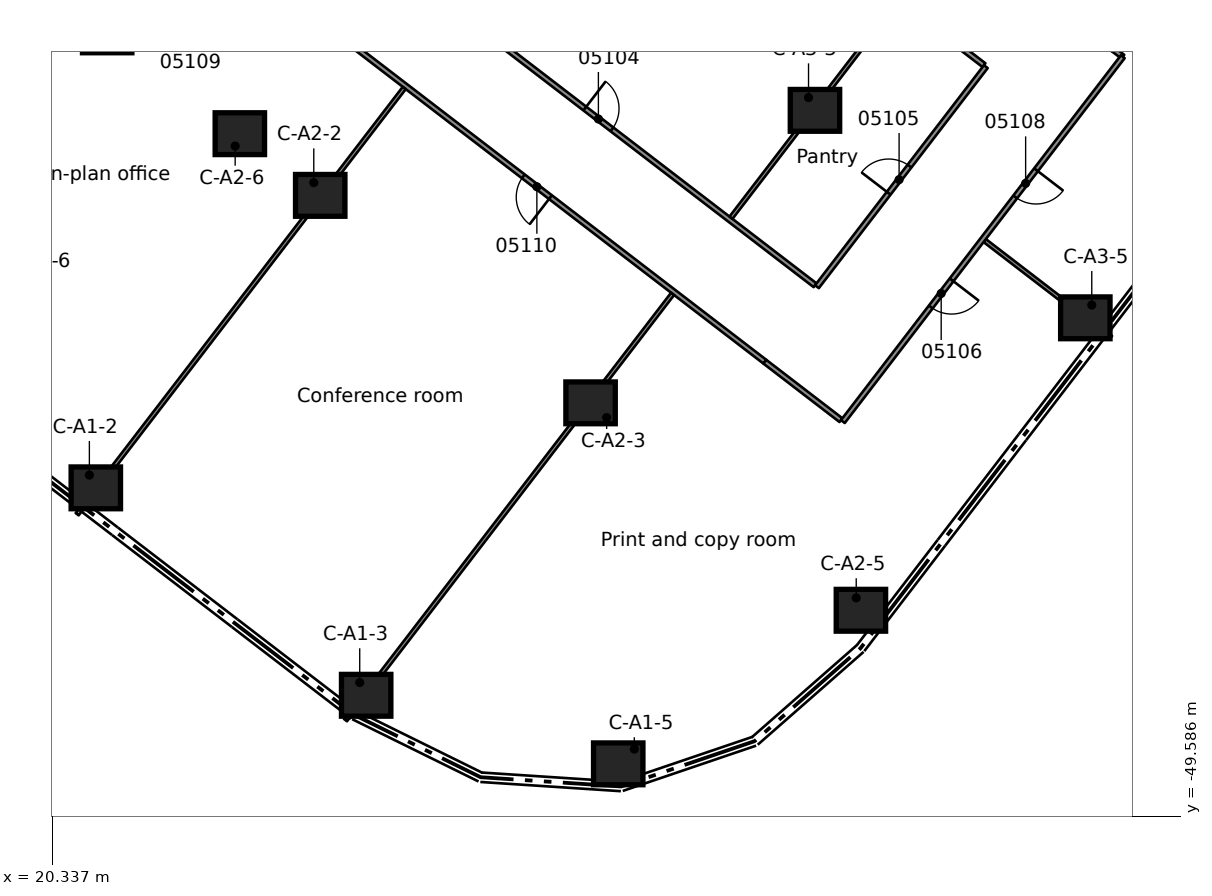
"""IFC4 building model, lengths in metres.
Left out: names, types, materials, properties, quantities, classifications, styles, units other than length and angle.
Written with IfcOpenShell. Run it as: python <this file> out.ifc"""

import sys

from ifc_helpers import new_model, si_unit, direction, frame, frame_2d, origin, origin_2d, place, context, subcontext, project, spatial, rectangle, extrude, element, fill, save


model = new_model("IFC4")
c1 = context("Model", 3, precision=1e-05, world=origin(), true_north=direction((0.0, 1.0)))
c2 = subcontext(c1, "Body", "Model", "MODEL_VIEW")
j1 = project(units=[si_unit("LENGTHUNIT", "METRE"), si_unit("PLANEANGLEUNIT", "RADIAN")], contexts=[c1])
p1 = place(None, origin())
s1 = spatial("IfcSite", under=j1, at=p1, CompositionType="ELEMENT")
p2 = place(p1, origin())
s2 = spatial("IfcBuilding", under=s1, at=p2, CompositionType="ELEMENT")
p3 = place(p2, frame((0.0, 0.0, 25.1)))
s3 = spatial("IfcBuildingStorey", under=s2, at=p3, CompositionType="ELEMENT", Elevation=25.1)
for number, where, z_axis, x_axis in (
    (1, (21.484, -40.939, 0.0), (0.0, 0.0, 1.0), (1.0, 0.0, 0.0)),
    (2, (28.598, -46.397, 0.0), (0.0, 0.0, 1.0), (1.0, 0.0, 0.0)),
    (3, (35.231, -48.201, 0.0), (0.0, 0.0, 1.0), (1.0, 0.0, 0.0)),
    (4, (27.389, -33.243, 0.0), (0.0, 0.0, 1.0), (1.0, 0.0, 0.0)),
    (5, (34.503, -38.702, 0.0), (0.0, 0.0, 1.0), (1.0, 0.0, 0.0)),
    (6, (41.617, -44.16, 0.0), (0.0, 0.0, 1.0), (1.0, 0.0, 0.0)),
    (7, (25.274, -31.62, 0.0), (0.0, 0.0, 1.0), (1.0, 0.0, 0.0)),
    (8, (21.783, -28.941, 0.0), (0.0, 0.0, 1.0), (1.0, 0.0, 0.0)),
    (9, (40.408, -31.006, 0.0), (0.0, 0.0, 1.0), (1.0, 0.0, 0.0)),
    (10, (47.522, -36.465, 0.0), (0.0, 0.0, 1.0), (1.0, 0.0, 0.0)),
):
    element("IfcColumn", number, at=place(p3, frame(where, z_axis=z_axis, x_axis=x_axis)), inside=s3, PredefinedType="COLUMN", context=c2, shape_type="SweptSolid", body=[
        extrude(rectangle(XDim=1.3, YDim=1.1, at=origin_2d()), origin(), (0.0, 0.0, 1.0), 4.1),
    ])
p4 = place(p3, frame((48.27, -29.412, 0.0), z_axis=(0.0, 0.0, 1.0), x_axis=(0.793016893484, -0.609199644328, 0.0)))
e11 = element("IfcWall", 11, at=p4, inside=s3, PredefinedType="PARTITIONING", context=c2, shape_type="SweptSolid", body=[
    extrude(rectangle(XDim=0.3, YDim=0.125, at=frame_2d((0.15, 0.0))), origin(), (0.0, 0.0, 1.0), 3.68),
])
p5 = place(p3, frame((39.09, -37.62, 0.0), z_axis=(0.0, 0.0, 1.0), x_axis=(-0.793364364442, 0.608747061786, 0.0)))
e12 = element("IfcWall", 12, at=p5, inside=s3, PredefinedType="PARTITIONING", context=c2, shape_type="SweptSolid", body=[
    extrude(rectangle(XDim=22.17, YDim=0.125, at=frame_2d((11.085, 0.0))), origin(), (0.0, 0.0, 1.0), 3.68),
])
p6 = place(p5, frame((16.263, 0.0, 0.0)))
e13 = element("IfcOpeningElement", 13, at=p6, cuts=e12, PredefinedType="OPENING", context=c2, shape_type="SweptSolid", body=[
    extrude(rectangle(XDim=1.8, YDim=2.1, at=frame_2d((0.9, 1.05))), frame((0.0, 0.073, 0.0), z_axis=(0.0, -1.0, 0.0), x_axis=(1.0, 0.0, 0.0)), (0.0, 0.0, 1.0), 0.145),
])
p7 = place(p5, frame((7.113, 0.0, 0.0)))
e14 = element("IfcOpeningElement", 14, at=p7, cuts=e12, PredefinedType="OPENING", context=c2, shape_type="SweptSolid", body=[
    extrude(rectangle(XDim=0.9, YDim=2.1, at=frame_2d((0.45, 1.05))), frame((0.0, 0.073, 0.0), z_axis=(0.0, -1.0, 0.0), x_axis=(1.0, 0.0, 0.0)), (0.0, 0.0, 1.0), 0.145),
])
p8 = place(p3, frame((39.089, -37.62, 0.0), z_axis=(0.0, 0.0, 1.0), x_axis=(0.793216962218, -0.608939119166, 0.0)))
e15 = element("IfcWall", 15, at=p8, inside=s3, PredefinedType="PARTITIONING", context=c2, shape_type="SweptSolid", body=[
    extrude(rectangle(XDim=2.524, YDim=0.125, at=frame_2d((1.262, 0.0))), origin(), (0.0, 0.0, 1.0), 3.68),
])
p9 = place(p3, frame((23.132, -22.35, 0.0), z_axis=(0.0, 0.0, 1.0), x_axis=(0.79336850047, -0.60874167137, 0.0)))
e16 = element("IfcWall", 16, at=p9, inside=s3, PredefinedType="PARTITIONING", context=c2, shape_type="SweptSolid", body=[
    extrude(rectangle(XDim=21.779, YDim=0.125, at=frame_2d((10.89, 0.0))), origin(), (0.0, 0.0, 1.0), 3.68),
])
p10 = place(p9, frame((4.6, 0.0, 0.0)))
e17 = element("IfcOpeningElement", 17, at=p10, cuts=e16, PredefinedType="OPENING", context=c2, shape_type="SweptSolid", body=[
    extrude(rectangle(XDim=0.9, YDim=2.1, at=frame_2d((0.45, 1.05))), frame((0.0, 0.073, 0.0), z_axis=(0.0, -1.0, 0.0), x_axis=(1.0, 0.0, 0.0)), (0.0, 0.0, 1.0), 0.145),
])
p11 = place(p9, frame((14.142, 0.0, 0.0)))
e18 = element("IfcOpeningElement", 18, at=p11, cuts=e16, PredefinedType="OPENING", context=c2, shape_type="SweptSolid", body=[
    extrude(rectangle(XDim=0.9, YDim=2.1, at=frame_2d((0.45, 1.05))), frame((0.0, 0.073, 0.0), z_axis=(0.0, -1.0, 0.0), x_axis=(1.0, 0.0, 0.0)), (0.0, 0.0, 1.0), 0.145),
])
p12 = place(p3, frame((44.875, -34.433, 0.0), z_axis=(0.0, 0.0, 1.0), x_axis=(0.793295570217, -0.60883670904, 0.0)))
e19 = element("IfcWall", 19, at=p12, inside=s3, PredefinedType="PARTITIONING", context=c2, shape_type="SweptSolid", body=[
    extrude(rectangle(XDim=4.186, YDim=0.1, at=frame_2d((2.093, 0.0))), origin(), (0.0, 0.0, 1.0), 3.68),
])
p13 = place(p3, frame((44.855, -29.817, 0.0), z_axis=(0.0, 0.0, 1.0), x_axis=(-0.793378264443, 0.608728945844, 0.0)))
e20 = element("IfcWall", 20, at=p13, inside=s3, PredefinedType="PARTITIONING", context=c2, shape_type="SweptSolid", body=[
    extrude(rectangle(XDim=21.16, YDim=0.125, at=frame_2d((10.58, 0.0))), origin(), (0.0, 0.0, 1.0), 3.68),
])
p14 = place(p13, frame((16.337, 0.0, 0.0)))
e21 = element("IfcOpeningElement", 21, at=p14, cuts=e20, PredefinedType="OPENING", context=c2, shape_type="SweptSolid", body=[
    extrude(rectangle(XDim=0.9, YDim=2.1, at=frame_2d((0.45, 1.05))), frame((0.0, 0.073, 0.0), z_axis=(0.0, -1.0, 0.0), x_axis=(1.0, 0.0, 0.0)), (0.0, 0.0, 1.0), 0.145),
])
p15 = place(p3, frame((48.508, -29.595, 0.0), z_axis=(0.0, 0.0, 1.0), x_axis=(-0.608738166201, -0.793371189929, 0.0)))
e22 = element("IfcWall", 22, at=p15, inside=s3, PredefinedType="PARTITIONING", context=c2, shape_type="SweptSolid", body=[
    extrude(rectangle(XDim=12.1, YDim=0.125, at=frame_2d((6.05, 0.0))), origin(), (0.0, 0.0, 1.0), 3.68),
])
p16 = place(p15, frame((7.4, 0.0, 0.0)))
e23 = element("IfcOpeningElement", 23, at=p16, cuts=e22, PredefinedType="OPENING", context=c2, shape_type="SweptSolid", body=[
    extrude(rectangle(XDim=0.9, YDim=2.1, at=frame_2d((0.45, 1.05))), frame((0.0, 0.073, 0.0), z_axis=(0.0, -1.0, 0.0), x_axis=(1.0, 0.0, 0.0)), (0.0, 0.0, 1.0), 0.145),
])
p17 = place(p15, frame((3.75, 0.0, 0.0)))
e24 = element("IfcOpeningElement", 24, at=p17, cuts=e22, PredefinedType="OPENING", context=c2, shape_type="SweptSolid", body=[
    extrude(rectangle(XDim=0.9, YDim=2.1, at=frame_2d((0.45, 1.05))), frame((0.0, 0.073, 0.0), z_axis=(0.0, -1.0, 0.0), x_axis=(1.0, 0.0, 0.0)), (0.0, 0.0, 1.0), 0.145),
])
p18 = place(p3, frame((40.46, -35.646, 0.0), z_axis=(0.0, 0.0, 1.0), x_axis=(0.608868228501, 0.793271378736, 0.0)))
e25 = element("IfcWall", 25, at=p18, inside=s3, PredefinedType="PARTITIONING", context=c2, shape_type="SweptSolid", body=[
    extrude(rectangle(XDim=7.299, YDim=0.125, at=frame_2d((3.649, 0.0))), origin(), (0.0, 0.0, 1.0), 3.68),
])
p19 = place(p18, frame((3.1, 0.0, 0.0)))
e26 = element("IfcOpeningElement", 26, at=p19, cuts=e25, PredefinedType="OPENING", context=c2, shape_type="SweptSolid", body=[
    extrude(rectangle(XDim=0.9, YDim=2.1, at=frame_2d((0.45, 1.05))), frame((0.0, 0.073, 0.0), z_axis=(0.0, -1.0, 0.0), x_axis=(1.0, 0.0, 0.0)), (0.0, 0.0, 1.0), 0.145),
])
p20 = place(p3, frame((28.054, -47.051, 0.0), z_axis=(0.0, 0.0, 1.0), x_axis=(0.608819037892, 0.793309132117, 0.0)))
e27 = element("IfcWall", 27, at=p20, inside=s3, PredefinedType="PARTITIONING", context=c2, shape_type="SweptSolid", body=[
    extrude(rectangle(XDim=14.137, YDim=0.1, at=frame_2d((7.069, 0.0))), origin(), (0.0, 0.0, 1.0), 3.68),
])
p21 = place(p3, frame((38.198, -33.831, 0.0), z_axis=(0.0, 0.0, 1.0), x_axis=(0.60875801413, 0.793355960608, 0.0)))
e28 = element("IfcWall", 28, at=p21, inside=s3, PredefinedType="PARTITIONING", context=c2, shape_type="SweptSolid", body=[
    extrude(rectangle(XDim=7.174, YDim=0.1, at=frame_2d((3.587, 0.0))), origin(), (0.0, 0.0, 1.0), 3.68),
])
p22 = place(p3, frame((20.993, -41.633, 0.0), z_axis=(0.0, 0.0, 1.0), x_axis=(0.608829906099, 0.793300791277, 0.0)))
e29 = element("IfcWall", 29, at=p22, inside=s3, PredefinedType="PARTITIONING", context=c2, shape_type="SweptSolid", body=[
    extrude(rectangle(XDim=14.137, YDim=0.1, at=frame_2d((7.069, 0.0))), origin(), (0.0, 0.0, 1.0), 3.68),
])
p23 = place(p3, frame((12.817, -35.359, 0.0), z_axis=(0.0, 0.0, 1.0), x_axis=(0.608769712687, 0.793346983932, 0.0)))
e30 = element("IfcWall", 30, at=p23, inside=s3, PredefinedType="PARTITIONING", context=c2, shape_type="SweptSolid", body=[
    extrude(rectangle(XDim=14.199, YDim=0.1, at=frame_2d((7.1, 0.0))), origin(), (0.0, 0.0, 1.0), 3.68),
])
p24 = place(p11, origin())
e31 = element("IfcDoor", 31, at=p24, inside=s3, OperationType="SINGLE_SWING_RIGHT", PredefinedType="DOOR", context=c2, shape_type="SweptSolid", body=[
    extrude(rectangle(XDim=0.9, YDim=2.1, at=frame_2d((0.45, 1.05))), frame((0.0, 0.025, 0.0), z_axis=(0.0, -1.0, 0.0), x_axis=(1.0, 0.0, 0.0)), (0.0, 0.0, 1.0), 0.05),
])
fill(e18, e31)
p25 = place(p19, origin())
e32 = element("IfcDoor", 32, at=p25, inside=s3, OperationType="SINGLE_SWING_LEFT", PredefinedType="DOOR", context=c2, shape_type="SweptSolid", body=[
    extrude(rectangle(XDim=0.9, YDim=2.1, at=frame_2d((0.45, 1.05))), frame((0.0, 0.025, 0.0), z_axis=(0.0, -1.0, 0.0), x_axis=(1.0, 0.0, 0.0)), (0.0, 0.0, 1.0), 0.05),
])
fill(e26, e32)
p26 = place(p16, origin())
e33 = element("IfcDoor", 33, at=p26, inside=s3, OperationType="SINGLE_SWING_RIGHT", PredefinedType="DOOR", context=c2, shape_type="SweptSolid", body=[
    extrude(rectangle(XDim=0.9, YDim=2.1, at=frame_2d((0.45, 1.05))), frame((0.0, 0.025, 0.0), z_axis=(0.0, -1.0, 0.0), x_axis=(1.0, 0.0, 0.0)), (0.0, 0.0, 1.0), 0.05),
])
fill(e23, e33)
p27 = place(p17, origin())
e34 = element("IfcDoor", 34, at=p27, inside=s3, OperationType="SINGLE_SWING_LEFT", PredefinedType="DOOR", context=c2, shape_type="SweptSolid", body=[
    extrude(rectangle(XDim=0.9, YDim=2.1, at=frame_2d((0.45, 1.05))), frame((0.0, 0.025, 0.0), z_axis=(0.0, -1.0, 0.0), x_axis=(1.0, 0.0, 0.0)), (0.0, 0.0, 1.0), 0.05),
])
fill(e24, e34)
p28 = place(p7, origin())
e35 = element("IfcDoor", 35, at=p28, inside=s3, OperationType="SINGLE_SWING_LEFT", PredefinedType="DOOR", context=c2, shape_type="SweptSolid", body=[
    extrude(rectangle(XDim=0.9, YDim=2.1, at=frame_2d((0.45, 1.05))), frame((0.0, 0.025, 0.0), z_axis=(0.0, -1.0, 0.0), x_axis=(1.0, 0.0, 0.0)), (0.0, 0.0, 1.0), 0.05),
])
fill(e14, e35)
save(model, sys.argv[1])
